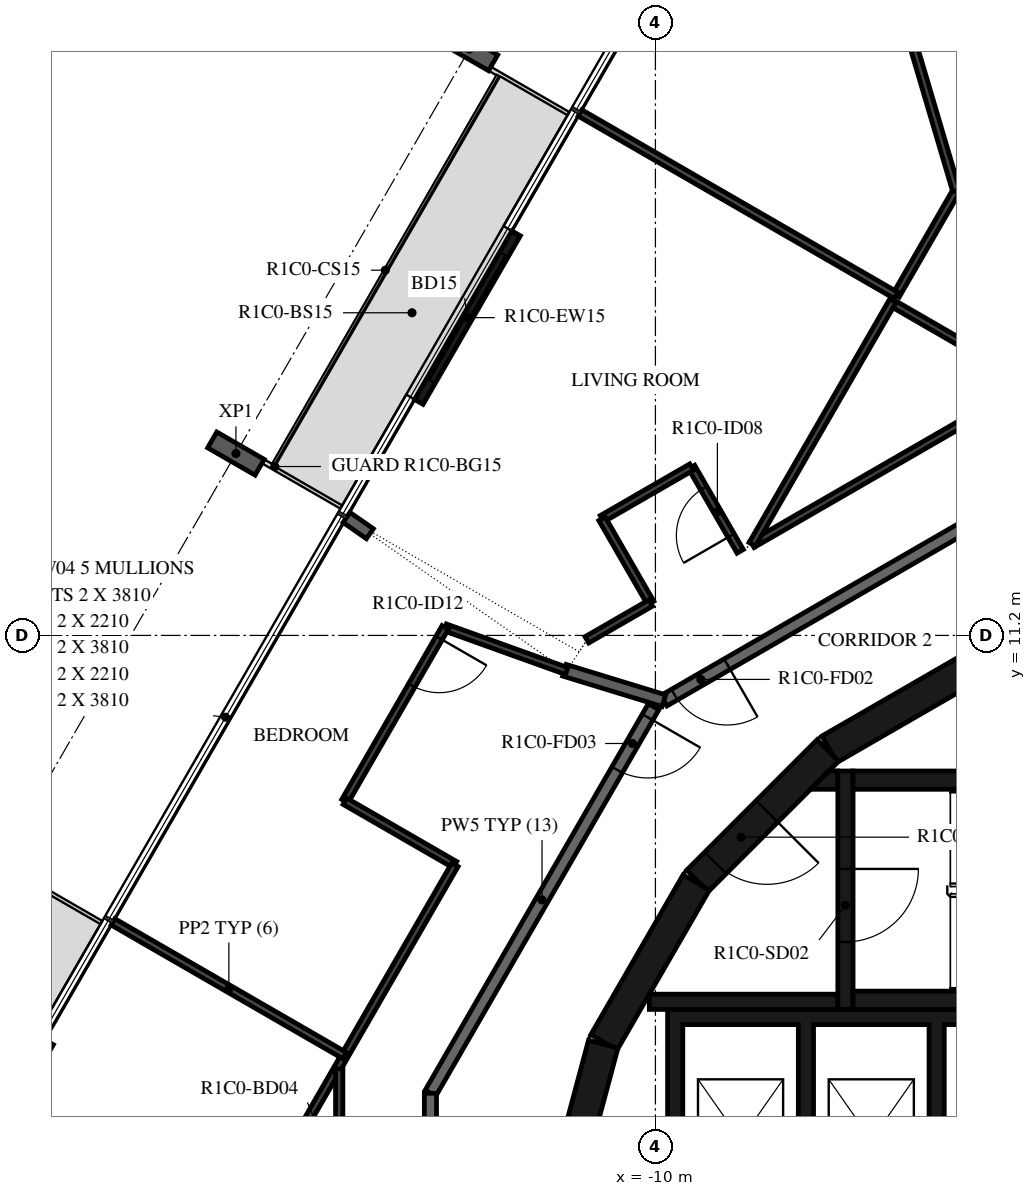
"""IFC4 building model, lengths in metres.
Left out: names, types, materials, properties, quantities, classifications, styles, units other than length and angle.
Written with IfcOpenShell. Run it as: python <this file> out.ifc"""

import sys

from ifc_helpers import new_model, si_unit, direction, frame, frame_2d, origin, origin_2d, place, context, subcontext, project, spatial, polyline, rectangle, i_section, outline, extrude, element, fill, save


model = new_model("IFC4")
c1 = context("Model", 3, precision=1e-05, world=origin(), true_north=direction((0.0, 1.0)))
c2 = subcontext(c1, "Body", "Model", "MODEL_VIEW")
j1 = project(units=[si_unit("LENGTHUNIT", "METRE"), si_unit("PLANEANGLEUNIT", "RADIAN")], contexts=[c1])
p1 = place(None, origin())
s1 = spatial("IfcSite", under=j1, at=p1, CompositionType="ELEMENT")
p2 = place(p1, origin())
s2 = spatial("IfcBuilding", under=s1, at=p2, CompositionType="ELEMENT")
p3 = place(p2, frame((0.0, 0.0, 59.4)))
s3 = spatial("IfcBuildingStorey", under=s2, at=p3, CompositionType="ELEMENT", Elevation=59.4)
for number, where, z_axis, x_axis in (
    (1, (-13.059, 20.842, -0.38), (0.0, 0.0, 1.0), (0.5, 0.866, 0.0)),
    (2, (-16.899, 14.19, -0.38), (0.0, 0.0, 1.0), (0.5, 0.866, 0.0)),
):
    element("IfcColumn", number, at=place(p3, frame(where, z_axis=z_axis, x_axis=x_axis)), inside=s3, PredefinedType="COLUMN", context=c2, shape_type="SweptSolid", body=[
        extrude(i_section(OverallWidth=0.3, OverallDepth=0.9, WebThickness=0.019, FlangeThickness=0.035, FilletRadius=0.03, at=origin_2d()), origin(), (0.0, 0.0, 1.0), 3.5),
    ])
p4 = place(p3, frame((-12.291, 17.812, 0.0), z_axis=(0.0, 0.0, 1.0), x_axis=(-0.499971222258, -0.866042017984, 0.0)))
e3 = element("IfcWall", 3, at=p4, inside=s3, PredefinedType="STANDARD", context=c2, shape_type="SweptSolid", body=[
    extrude(rectangle(XDim=3.2, YDim=0.16, at=frame_2d((1.6, 0.0))), origin(), (0.0, 0.0, 1.0), 3.12),
])
p5 = place(p4, frame((0.4, 0.0, 0.0)))
e4 = element("IfcOpeningElement", 4, at=p5, cuts=e3, PredefinedType="OPENING", context=c2, shape_type="SweptSolid", body=[
    extrude(rectangle(XDim=2.4, YDim=2.4, at=frame_2d((1.2, 1.2))), frame((0.0, 0.09, 0.0), z_axis=(0.0, -1.0, 0.0), x_axis=(1.0, 0.0, 0.0)), (0.0, 0.0, 1.0), 0.18),
])
p6 = place(p3, frame((-19.971, 4.51, 0.0), z_axis=(0.0, 0.0, 1.0), x_axis=(-0.500028443584, -0.866008981251, 0.0)))
e5 = element("IfcWall", 5, at=p6, inside=s3, PredefinedType="STANDARD", context=c2, shape_type="SweptSolid", body=[
    extrude(rectangle(XDim=3.2, YDim=0.16, at=frame_2d((1.6, 0.0))), origin(), (0.0, 0.0, 1.0), 3.12),
])
p7 = place(p6, frame((0.4, 0.0, 0.0)))
e6 = element("IfcOpeningElement", 6, at=p7, cuts=e5, PredefinedType="OPENING", context=c2, shape_type="SweptSolid", body=[
    extrude(rectangle(XDim=2.4, YDim=2.4, at=frame_2d((1.2, 1.2))), frame((0.0, 0.09, 0.0), z_axis=(0.0, -1.0, 0.0), x_axis=(1.0, 0.0, 0.0)), (0.0, 0.0, 1.0), 0.18),
])
p8 = place(p3, frame((-4.51, 10.845, 0.0), z_axis=(0.0, 0.0, 1.0), x_axis=(-0.865975092491, -0.500087131594, 0.0)))
e7 = element("IfcWall", 7, at=p8, inside=s3, PredefinedType="SHEAR", context=c2, shape_type="SweptSolid", body=[
    extrude(rectangle(XDim=3.033, YDim=0.5, at=frame_2d((1.516, 0.0))), origin(), (0.0, 0.0, 1.0), 3.12),
])
p9 = place(p3, frame((-7.164, 9.308, 0.0), z_axis=(0.0, 0.0, 1.0), x_axis=(-0.707106781187, -0.707106781187, 0.0)))
e8 = element("IfcWall", 8, at=p9, inside=s3, PredefinedType="SHEAR", context=c2, shape_type="SweptSolid", body=[
    extrude(rectangle(XDim=3.032, YDim=0.5, at=frame_2d((1.516, 0.0))), origin(), (0.0, 0.0, 1.0), 3.12),
])
p10 = place(p9, frame((1.416, 0.0, 0.0)))
e9 = element("IfcOpeningElement", 9, at=p10, cuts=e8, PredefinedType="OPENING", context=c2, shape_type="SweptSolid", body=[
    extrude(rectangle(XDim=1.2, YDim=2.1, at=frame_2d((0.6, 1.05))), frame((0.0, 0.26, 0.0), z_axis=(0.0, -1.0, 0.0), x_axis=(1.0, 0.0, 0.0)), (0.0, 0.0, 1.0), 0.52),
])
for number, where, z_axis, x_axis in (
    (10, (-9.329, 7.137, 0.0), (0.0, 0.0, 1.0), (-0.5, -0.866, 0.0)),
    (11, (-10.858, 4.479, 0.0), (0.0, 0.0, 1.0), (-0.259, -0.966, 0.0)),
):
    element("IfcWall", number, at=place(p3, frame(where, z_axis=z_axis, x_axis=x_axis)), inside=s3, PredefinedType="SHEAR", context=c2, shape_type="SweptSolid", body=[
        extrude(rectangle(XDim=3.033, YDim=0.5, at=frame_2d((1.516, 0.0))), origin(), (0.0, 0.0, 1.0), 3.12),
    ])
for number, where, z_axis, x_axis in (
    (12, (-6.75, 5.2, 0.0), (0.0, 0.0, 1.0), (1.0, 0.0, 0.0)),
    (13, (-6.75, 8.82, 0.0), (0.0, 0.0, 1.0), (1.0, 0.0, 0.0)),
):
    element("IfcWall", number, at=place(p3, frame(where, z_axis=z_axis, x_axis=x_axis)), inside=s3, PredefinedType="SHEAR", context=c2, shape_type="SweptSolid", body=[
        extrude(rectangle(XDim=6.75, YDim=0.3, at=frame_2d((3.375, 0.0))), origin(), (0.0, 0.0, 1.0), 3.12),
    ])
p11 = place(p3, frame((-6.875, 8.97, 0.0), z_axis=(0.0, 0.0, 1.0), x_axis=(0.0, -1.0, 0.0)))
e14 = element("IfcWall", 14, at=p11, inside=s3, PredefinedType="SHEAR", context=c2, shape_type="SweptSolid", body=[
    extrude(rectangle(XDim=3.92, YDim=0.25, at=frame_2d((1.96, 0.0))), origin(), (0.0, 0.0, 1.0), 3.12),
])
p12 = place(p11, frame((1.61, 0.0, 0.0)))
e15 = element("IfcOpeningElement", 15, at=p12, cuts=e14, PredefinedType="OPENING", context=c2, shape_type="SweptSolid", body=[
    extrude(rectangle(XDim=1.2, YDim=2.1, at=frame_2d((0.6, 1.05))), frame((0.0, 0.135, 0.0), z_axis=(0.0, -1.0, 0.0), x_axis=(1.0, 0.0, 0.0)), (0.0, 0.0, 1.0), 0.27),
])
p13 = place(p3, frame((-7.0, 5.175, 0.0), z_axis=(0.0, 0.0, 1.0), x_axis=(-1.0, 0.0, 0.0)))
e16 = element("IfcWall", 16, at=p13, inside=s3, PredefinedType="SHEAR", context=c2, shape_type="SweptSolid", body=[
    extrude(rectangle(XDim=3.1, YDim=0.25, at=frame_2d((1.55, 0.0))), origin(), (0.0, 0.0, 1.0), 3.12),
])
p14 = place(p3, origin())
e17 = element("IfcWall", 17, at=p14, inside=s3, PredefinedType="SHEAR", context=c2, shape_type="SweptSolid", body=[
    extrude(outline(polyline([(-7.148, 8.97), (-7.0, 8.97), (-7.0, 8.67), (-7.448, 8.67), (-7.148, 8.97)])), origin(), (0.0, 0.0, 1.0), 3.12),
])
p15 = place(p3, origin())
e18 = element("IfcWall", 18, at=p15, inside=s3, PredefinedType="SHEAR", context=c2, shape_type="SweptSolid", body=[
    extrude(outline(polyline([(-9.55, 4.8), (-7.65, 4.8), (-7.65, 1.9), (-7.4, 1.9), (-7.4, 4.8), (-5.5, 4.8), (-5.5, 1.9), (-5.25, 1.9), (-5.25, 4.8), (-3.35, 4.8), (-3.35, 1.9), (-3.1, 1.9), (-3.1, 4.8), (-1.2, 4.8), (-1.2, 1.9), (-0.95, 1.9), (-0.95, 4.8), (3.1, 4.8), (3.1, 1.9), (3.35, 1.9), (3.35, 4.8), (5.25, 4.8), (5.25, 1.9), (5.5, 1.9), (5.5, 4.8), (7.4, 4.8), (7.4, 1.9), (7.65, 1.9), (7.65, 4.8), (9.55, 4.8), (9.55, 1.9), (9.8, 1.9), (9.8, 4.8), (9.8, 5.05), (-9.8, 5.05), (-9.8, 4.8), (-9.8, 1.9), (-9.55, 1.9), (-9.55, 4.8)])), origin(), (0.0, 0.0, 1.0), 3.12),
])
p16 = place(p3, frame((-3.671, 13.7, 0.0), z_axis=(0.0, 0.0, 1.0), x_axis=(-0.866031419417, -0.499989580474, 0.0)))
e19 = element("IfcWall", 19, at=p16, inside=s3, PredefinedType="STANDARD", context=c2, shape_type="SweptSolid", body=[
    extrude(rectangle(XDim=7.147, YDim=0.2, at=frame_2d((3.573, 0.0))), origin(), (0.0, 0.0, 1.0), 3.12),
])
p17 = place(p16, frame((5.947, 0.0, 0.0)))
e20 = element("IfcOpeningElement", 20, at=p17, cuts=e19, PredefinedType="OPENING", context=c2, shape_type="SweptSolid", body=[
    extrude(rectangle(XDim=1.0, YDim=2.1, at=frame_2d((0.5, 1.05))), frame((0.0, 0.11, 0.0), z_axis=(0.0, -1.0, 0.0), x_axis=(1.0, 0.0, 0.0)), (0.0, 0.0, 1.0), 0.22),
])
p18 = place(p3, frame((-10.029, 10.029, 0.0), z_axis=(0.0, 0.0, 1.0), x_axis=(-0.500001669485, -0.866024439905, 0.0)))
e21 = element("IfcWall", 21, at=p18, inside=s3, PredefinedType="STANDARD", context=c2, shape_type="SweptSolid", body=[
    extrude(rectangle(XDim=7.342, YDim=0.2, at=frame_2d((3.671, 0.0))), origin(), (0.0, 0.0, 1.0), 3.12),
])
p19 = place(p18, frame((0.2, 0.0, 0.0)))
e22 = element("IfcOpeningElement", 22, at=p19, cuts=e21, PredefinedType="OPENING", context=c2, shape_type="SweptSolid", body=[
    extrude(rectangle(XDim=1.0, YDim=2.1, at=frame_2d((0.5, 1.05))), frame((0.0, 0.11, 0.0), z_axis=(0.0, -1.0, 0.0), x_axis=(1.0, 0.0, 0.0)), (0.0, 0.0, 1.0), 0.22),
])
p20 = place(p3, frame((-13.7, 3.671, 0.0), z_axis=(0.0, 0.0, 1.0), x_axis=(0.0, -1.0, 0.0)))
e23 = element("IfcWall", 23, at=p20, inside=s3, PredefinedType="STANDARD", context=c2, shape_type="SweptSolid", body=[
    extrude(rectangle(XDim=7.342, YDim=0.2, at=frame_2d((3.671, 0.0))), origin(), (0.0, 0.0, 1.0), 3.12),
])
p21 = place(p3, frame((-11.496, 10.627, 0.0), z_axis=(0.0, 0.0, 1.0), x_axis=(0.956240708563, -0.292581112321, 0.0)))
e24 = element("IfcWall", 24, at=p21, inside=s3, PredefinedType="STANDARD", context=c2, shape_type="SweptSolid", body=[
    extrude(rectangle(XDim=1.711, YDim=0.2, at=frame_2d((0.855, 0.0))), origin(), (0.0, 0.0, 1.0), 3.12),
])
p22 = place(p3, frame((-15.08, 13.14, 0.0), z_axis=(0.0, 0.0, 1.0), x_axis=(0.820309143391, -0.571920369692, 0.0)))
e25 = element("IfcWall", 25, at=p22, inside=s3, PredefinedType="STANDARD", context=c2, shape_type="SweptSolid", body=[
    extrude(rectangle(XDim=0.468, YDim=0.2, at=frame_2d((0.234, 0.0))), origin(), (0.0, 0.0, 1.0), 3.12),
])
p23 = place(p3, frame((-4.073, 15.2, 0.0), z_axis=(0.0, 0.0, 1.0), x_axis=(-0.866034514313, -0.499984219769, 0.0)))
e26 = element("IfcWall", 26, at=p23, inside=s3, PredefinedType="PARTITIONING", context=c2, shape_type="SweptSolid", body=[
    extrude(rectangle(XDim=5.006, YDim=0.12, at=frame_2d((2.503, 0.0))), origin(), (0.0, 0.0, 1.0), 3.12),
])
p24 = place(p23, frame((0.2, 0.0, 0.0)))
e27 = element("IfcOpeningElement", 27, at=p24, cuts=e26, PredefinedType="OPENING", context=c2, shape_type="SweptSolid", body=[
    extrude(rectangle(XDim=0.8, YDim=2.1, at=frame_2d((0.4, 1.05))), frame((0.0, 0.07, 0.0), z_axis=(0.0, -1.0, 0.0), x_axis=(1.0, 0.0, 0.0)), (0.0, 0.0, 1.0), 0.14),
])
p25 = place(p3, frame((-8.606, 12.583, 0.0), z_axis=(0.0, 0.0, 1.0), x_axis=(-0.499995408039, 0.866028054938, 0.0)))
e28 = element("IfcWall", 28, at=p25, inside=s3, PredefinedType="PARTITIONING", context=c2, shape_type="SweptSolid", body=[
    extrude(rectangle(XDim=1.6, YDim=0.12, at=frame_2d((0.8, 0.0))), origin(), (0.0, 0.0, 1.0), 3.12),
])
p26 = place(p25, frame((0.3, 0.0, 0.0)))
e29 = element("IfcOpeningElement", 29, at=p26, cuts=e28, PredefinedType="OPENING", context=c2, shape_type="SweptSolid", body=[
    extrude(rectangle(XDim=0.9, YDim=2.1, at=frame_2d((0.45, 1.05))), frame((0.0, 0.07, 0.0), z_axis=(0.0, -1.0, 0.0), x_axis=(1.0, 0.0, 0.0)), (0.0, 0.0, 1.0), 0.14),
])
p27 = place(p3, frame((-9.406, 13.969, 0.0), z_axis=(0.0, 0.0, 1.0), x_axis=(-0.865989465428, -0.500062241894, 0.0)))
e30 = element("IfcWall", 30, at=p27, inside=s3, PredefinedType="PARTITIONING", context=c2, shape_type="SweptSolid", body=[
    extrude(rectangle(XDim=1.7, YDim=0.12, at=frame_2d((0.85, 0.0))), origin(), (0.0, 0.0, 1.0), 3.12),
])
p28 = place(p3, frame((-10.878, 13.118, 0.0), z_axis=(0.0, 0.0, 1.0), x_axis=(0.500061482766, -0.865989903783, 0.0)))
e31 = element("IfcWall", 31, at=p28, inside=s3, PredefinedType="PARTITIONING", context=c2, shape_type="SweptSolid", body=[
    extrude(rectangle(XDim=1.6, YDim=0.12, at=frame_2d((0.8, 0.0))), origin(), (0.0, 0.0, 1.0), 3.12),
])
p29 = place(p3, frame((-10.078, 11.733, 0.0), z_axis=(0.0, 0.0, 1.0), x_axis=(-0.866014416983, -0.500019029215, 0.0)))
e32 = element("IfcWall", 32, at=p29, inside=s3, PredefinedType="PARTITIONING", context=c2, shape_type="SweptSolid", body=[
    extrude(rectangle(XDim=1.211, YDim=0.12, at=frame_2d((0.606, 0.0))), origin(), (0.0, 0.0, 1.0), 3.12),
])
p30 = place(p3, frame((-1.907, 23.957, 0.0), z_axis=(0.0, 0.0, 1.0), x_axis=(-0.499994901178, -0.866028347571, 0.0)))
e33 = element("IfcWall", 33, at=p30, inside=s3, PredefinedType="PARTITIONING", context=c2, shape_type="SweptSolid", body=[
    extrude(rectangle(XDim=8.274, YDim=0.12, at=frame_2d((4.137, 0.0))), origin(), (0.0, 0.0, 1.0), 3.12),
])
p31 = place(p30, frame((4.387, 0.0, 0.0)))
e34 = element("IfcOpeningElement", 34, at=p31, cuts=e33, PredefinedType="OPENING", context=c2, shape_type="SweptSolid", body=[
    extrude(rectangle(XDim=0.9, YDim=2.1, at=frame_2d((0.45, 1.05))), frame((0.0, 0.07, 0.0), z_axis=(0.0, -1.0, 0.0), x_axis=(1.0, 0.0, 0.0)), (0.0, 0.0, 1.0), 0.14),
])
p32 = place(p3, frame((-6.114, 16.67, 0.0), z_axis=(0.0, 0.0, 1.0), x_axis=(0.866011328839, -0.500024377727, 0.0)))
e35 = element("IfcWall", 35, at=p32, inside=s3, PredefinedType="PARTITIONING", context=c2, shape_type="SweptSolid", body=[
    extrude(rectangle(XDim=2.94, YDim=0.12, at=frame_2d((1.47, 0.0))), origin(), (0.0, 0.0, 1.0), 3.12),
])
p33 = place(p3, frame((-7.4, 26.443, 0.0), z_axis=(0.0, 0.0, 1.0), x_axis=(0.283777867447, -0.95889004685, 0.0)))
e36 = element("IfcWall", 36, at=p33, inside=s3, PredefinedType="PARTITIONING", context=c2, shape_type="SweptSolid", body=[
    extrude(rectangle(XDim=8.274, YDim=0.12, at=frame_2d((4.137, 0.0))), origin(), (0.0, 0.0, 1.0), 3.12),
])
p34 = place(p33, frame((0.8, 0.0, 0.0)))
e37 = element("IfcOpeningElement", 37, at=p34, cuts=e36, PredefinedType="OPENING", context=c2, shape_type="SweptSolid", body=[
    extrude(rectangle(XDim=0.9, YDim=2.1, at=frame_2d((0.45, 1.05))), frame((0.0, 0.07, 0.0), z_axis=(0.0, -1.0, 0.0), x_axis=(1.0, 0.0, 0.0)), (0.0, 0.0, 1.0), 0.14),
])
p35 = place(p3, frame((-11.24, 19.792, 0.0), z_axis=(0.0, 0.0, 1.0), x_axis=(0.866031096941, -0.499990139034, 0.0)))
e38 = element("IfcWall", 38, at=p35, inside=s3, PredefinedType="PARTITIONING", context=c2, shape_type="SweptSolid", body=[
    extrude(rectangle(XDim=6.0, YDim=0.12, at=frame_2d((3.0, 0.0))), origin(), (0.0, 0.0, 1.0), 2.73),
])
p36 = place(p3, frame((-6.094, 16.705, 0.0), z_axis=(0.0, 0.0, 1.0), x_axis=(-0.500014747178, -0.86601688933, 0.0)))
e39 = element("IfcWall", 39, at=p36, inside=s3, PredefinedType="PARTITIONING", context=c2, shape_type="SweptSolid", body=[
    extrude(rectangle(XDim=4.627, YDim=0.12, at=frame_2d((2.313, 0.0))), origin(), (0.0, 0.0, 1.0), 3.12),
])
p37 = place(p3, frame((-11.458, 10.614, 0.0), z_axis=(0.0, 0.0, 1.0), x_axis=(-0.941092440198, 0.338149403375, 0.0)))
e40 = element("IfcWall", 40, at=p37, inside=s3, PredefinedType="PARTITIONING", context=c2, shape_type="SweptSolid", body=[
    extrude(rectangle(XDim=2.123, YDim=0.12, at=frame_2d((1.062, 0.0))), origin(), (0.0, 0.0, 1.0), 3.12),
])
p38 = place(p3, frame((-13.457, 11.332, 0.0), z_axis=(0.0, 0.0, 1.0), x_axis=(-0.499974350878, -0.866040211805, 0.0)))
e41 = element("IfcWall", 41, at=p38, inside=s3, PredefinedType="PARTITIONING", context=c2, shape_type="SweptSolid", body=[
    extrude(rectangle(XDim=3.3, YDim=0.12, at=frame_2d((1.65, 0.0))), origin(), (0.0, 0.0, 1.0), 3.12),
])
p39 = place(p38, frame((0.2, 0.0, 0.0)))
e42 = element("IfcOpeningElement", 42, at=p39, cuts=e41, PredefinedType="OPENING", context=c2, shape_type="SweptSolid", body=[
    extrude(rectangle(XDim=0.9, YDim=2.1, at=frame_2d((0.45, 1.05))), frame((0.0, 0.07, 0.0), z_axis=(0.0, -1.0, 0.0), x_axis=(1.0, 0.0, 0.0)), (0.0, 0.0, 1.0), 0.14),
])
p40 = place(p3, frame((-15.106, 8.474, 0.0), z_axis=(0.0, 0.0, 1.0), x_axis=(0.866041603473, -0.499971940267, 0.0)))
e43 = element("IfcWall", 43, at=p40, inside=s3, PredefinedType="PARTITIONING", context=c2, shape_type="SweptSolid", body=[
    extrude(rectangle(XDim=2.089, YDim=0.12, at=frame_2d((1.045, 0.0))), origin(), (0.0, 0.0, 1.0), 3.12),
])
p41 = place(p3, frame((-13.297, 7.429, 0.0), z_axis=(0.0, 0.0, 1.0), x_axis=(-0.49999903102, -0.866025963225, 0.0)))
e44 = element("IfcWall", 44, at=p41, inside=s3, PredefinedType="PARTITIONING", context=c2, shape_type="SweptSolid", body=[
    extrude(rectangle(XDim=7.667, YDim=0.12, at=frame_2d((3.833, 0.0))), origin(), (0.0, 0.0, 1.0), 3.12),
])
p42 = place(p3, frame((-15.2, 4.073, 0.0), z_axis=(0.0, 0.0, 1.0), x_axis=(0.0, -1.0, 0.0)))
e45 = element("IfcWall", 45, at=p42, inside=s3, PredefinedType="PARTITIONING", context=c2, shape_type="SweptSolid", body=[
    extrude(rectangle(XDim=4.398, YDim=0.12, at=frame_2d((2.199, 0.0))), origin(), (0.0, 0.0, 1.0), 3.12),
])
p43 = place(p42, frame((1.4, 0.0, 0.0)))
e46 = element("IfcOpeningElement", 46, at=p43, cuts=e45, PredefinedType="OPENING", context=c2, shape_type="SweptSolid", body=[
    extrude(rectangle(XDim=0.8, YDim=2.1, at=frame_2d((0.4, 1.05))), frame((0.0, 0.07, 0.0), z_axis=(0.0, -1.0, 0.0), x_axis=(1.0, 0.0, 0.0)), (0.0, 0.0, 1.0), 0.14),
])
p44 = place(p3, frame((-18.92, 6.49, 0.0), z_axis=(0.0, 0.0, 1.0), x_axis=(0.865994303029, -0.500053864221, 0.0)))
e47 = element("IfcWall", 47, at=p44, inside=s3, PredefinedType="PARTITIONING", context=c2, shape_type="SweptSolid", body=[
    extrude(rectangle(XDim=4.4, YDim=0.12, at=frame_2d((2.2, 0.0))), origin(), (0.0, 0.0, 1.0), 2.73),
])
p45 = place(p5, origin())
e48 = element("IfcDoor", 48, at=p45, inside=s3, OperationType="DOUBLE_DOOR_SLIDING", PredefinedType="DOOR", context=c2, shape_type="SweptSolid", body=[
    extrude(rectangle(XDim=2.4, YDim=2.4, at=frame_2d((1.2, 1.2))), frame((0.0, 0.025, 0.0), z_axis=(0.0, -1.0, 0.0), x_axis=(1.0, 0.0, 0.0)), (0.0, 0.0, 1.0), 0.05),
])
fill(e4, e48)
p46 = place(p12, origin())
e49 = element("IfcDoor", 49, at=p46, inside=s3, OperationType="SINGLE_SWING_LEFT", PredefinedType="DOOR", context=c2, shape_type="SweptSolid", body=[
    extrude(rectangle(XDim=1.2, YDim=2.1, at=frame_2d((0.6, 1.05))), frame((0.0, 0.025, 0.0), z_axis=(0.0, -1.0, 0.0), x_axis=(1.0, 0.0, 0.0)), (0.0, 0.0, 1.0), 0.05),
])
fill(e15, e49)
p47 = place(p10, origin())
e50 = element("IfcDoor", 50, at=p47, inside=s3, OperationType="SINGLE_SWING_RIGHT", PredefinedType="DOOR", context=c2, shape_type="SweptSolid", body=[
    extrude(rectangle(XDim=1.2, YDim=2.1, at=frame_2d((0.6, 1.05))), frame((0.0, 0.025, 0.0), z_axis=(0.0, -1.0, 0.0), x_axis=(1.0, 0.0, 0.0)), (0.0, 0.0, 1.0), 0.05),
])
fill(e9, e50)
p48 = place(p17, origin())
e51 = element("IfcDoor", 51, at=p48, inside=s3, OperationType="SINGLE_SWING_LEFT", PredefinedType="DOOR", context=c2, shape_type="SweptSolid", body=[
    extrude(rectangle(XDim=1.0, YDim=2.1, at=frame_2d((0.5, 1.05))), frame((0.0, 0.025, 0.0), z_axis=(0.0, -1.0, 0.0), x_axis=(1.0, 0.0, 0.0)), (0.0, 0.0, 1.0), 0.05),
])
fill(e20, e51)
p49 = place(p26, origin())
e52 = element("IfcDoor", 52, at=p49, inside=s3, OperationType="SINGLE_SWING_RIGHT", PredefinedType="DOOR", context=c2, shape_type="SweptSolid", body=[
    extrude(rectangle(XDim=0.9, YDim=2.1, at=frame_2d((0.45, 1.05))), frame((0.0, 0.025, 0.0), z_axis=(0.0, -1.0, 0.0), x_axis=(1.0, 0.0, 0.0)), (0.0, 0.0, 1.0), 0.05),
])
fill(e29, e52)
p50 = place(p19, origin())
e53 = element("IfcDoor", 53, at=p50, inside=s3, OperationType="SINGLE_SWING_LEFT", PredefinedType="DOOR", context=c2, shape_type="SweptSolid", body=[
    extrude(rectangle(XDim=1.0, YDim=2.1, at=frame_2d((0.5, 1.05))), frame((0.0, 0.025, 0.0), z_axis=(0.0, -1.0, 0.0), x_axis=(1.0, 0.0, 0.0)), (0.0, 0.0, 1.0), 0.05),
])
fill(e22, e53)
p51 = place(p39, origin())
e54 = element("IfcDoor", 54, at=p51, inside=s3, OperationType="SINGLE_SWING_LEFT", PredefinedType="DOOR", context=c2, shape_type="SweptSolid", body=[
    extrude(rectangle(XDim=0.9, YDim=2.1, at=frame_2d((0.45, 1.05))), frame((0.0, 0.025, 0.0), z_axis=(0.0, -1.0, 0.0), x_axis=(1.0, 0.0, 0.0)), (0.0, 0.0, 1.0), 0.05),
])
fill(e42, e54)
save(model, sys.argv[1])
